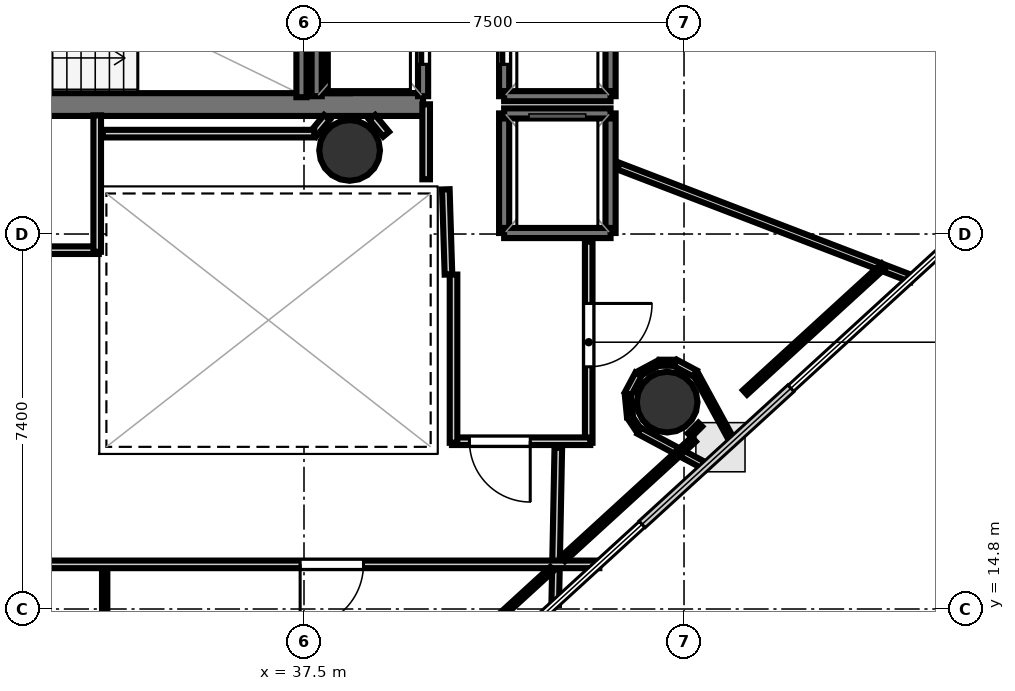
"""IFC4 building model, lengths in metres.
Left out: names, types, materials, properties, quantities, classifications, styles, units other than length and angle.
Written with IfcOpenShell. Run it as: python <this file> out.ifc"""

import sys

from ifc_helpers import new_model, si_unit, direction, frame, frame_2d, origin, origin_2d, place, context, subcontext, project, spatial, rectangle, hollow_circle, extrude, element, fill, save


model = new_model("IFC4")
c1 = context("Model", 3, precision=1e-05, world=origin(), true_north=direction((0.0, 1.0)))
c2 = subcontext(c1, "Body", "Model", "MODEL_VIEW")
j1 = project(units=[si_unit("LENGTHUNIT", "METRE"), si_unit("PLANEANGLEUNIT", "RADIAN")], contexts=[c1])
p1 = place(None, origin())
s1 = spatial("IfcSite", under=j1, at=p1, CompositionType="ELEMENT")
p2 = place(p1, origin())
s2 = spatial("IfcBuilding", under=s1, at=p2, CompositionType="ELEMENT")
p3 = place(p2, frame((0.0, 0.0, 222.5)))
s3 = spatial("IfcBuildingStorey", under=s2, at=p3, CompositionType="ELEMENT", Elevation=222.5)
p4 = place(p3, frame((29.33, 24.755, 0.0), z_axis=(0.0, 0.0, 1.0), x_axis=(1.0, 0.0, 0.0)))
e1 = element("IfcWall", 1, at=p4, inside=s3, PredefinedType="SHEAR", context=c2, shape_type="SweptSolid", body=[
    extrude(rectangle(XDim=10.52, YDim=0.45, at=frame_2d((5.26, 0.0))), origin(), (0.0, 0.0, 1.0), 3.52),
])
p5 = place(p4, frame((0.695, 0.0, 0.0)))
e2 = element("IfcOpeningElement", 2, at=p5, cuts=e1, PredefinedType="OPENING", context=c2, shape_type="SweptSolid", body=[
    extrude(rectangle(XDim=1.25, YDim=2.15, at=frame_2d((0.625, 1.075))), frame((0.0, 0.235, 0.0), z_axis=(0.0, -1.0, 0.0), x_axis=(1.0, 0.0, 0.0)), (0.0, 0.0, 1.0), 0.47),
])
p6 = place(p3, frame((38.18, 24.98, 0.0), z_axis=(0.0, 0.0, 1.0), x_axis=(0.0, 1.0, 0.0)))
e3 = element("IfcWall", 3, at=p6, inside=s3, PredefinedType="SHEAR", context=c2, shape_type="SweptSolid", body=[
    extrude(rectangle(XDim=7.44, YDim=0.45, at=frame_2d((3.72, 0.0))), origin(), (0.0, 0.0, 1.0), 3.52),
])
for number, where, z_axis, x_axis in (
    (4, (38.4, 23.85, 0.0), (0.0, 0.0, 1.0), (1.0, 0.0, 0.0)),
    (5, (44.667, 18.883, 0.0), (0.0, 0.0, 1.0), (1.0, 0.0, 0.0)),
):
    element("IfcColumn", number, at=place(p3, frame(where, z_axis=z_axis, x_axis=x_axis)), inside=s3, PredefinedType="COLUMN", context=c2, shape_type="SweptSolid", body=[
        extrude(hollow_circle(Radius=0.6, WallThickness=0.03, at=origin_2d()), origin(), (0.0, 0.0, 1.0), 3.7),
    ])
p7 = place(p3, frame((37.45, 24.9, 0.0), z_axis=(0.0, 0.0, 1.0), x_axis=(0.0, 1.0, 0.0)))
e6 = element("IfcWall", 6, at=p7, inside=s3, PredefinedType="SOLIDWALL", context=c2, shape_type="SweptSolid", body=[
    extrude(rectangle(XDim=3.06, YDim=0.2, at=frame_2d((1.53, 0.0))), origin(), (0.0, 0.0, 1.0), 3.52),
])
p8 = place(p3, frame((39.85, 24.92, 0.0), z_axis=(0.0, 0.0, 1.0), x_axis=(0.0, 1.0, 0.0)))
e7 = element("IfcWall", 7, at=p8, inside=s3, PredefinedType="SOLIDWALL", context=c2, shape_type="SweptSolid", body=[
    extrude(rectangle(XDim=2.36, YDim=0.2, at=frame_2d((1.18, 0.0))), origin(), (0.0, 0.0, 1.0), 3.52),
])
p9 = place(p8, frame((0.63, 0.0, 0.0)))
e8 = element("IfcOpeningElement", 8, at=p9, cuts=e7, PredefinedType="OPENING", context=c2, shape_type="SweptSolid", body=[
    extrude(rectangle(XDim=1.1, YDim=2.15, at=frame_2d((0.55, 1.075))), frame((0.0, 0.11, 0.0), z_axis=(0.0, -1.0, 0.0), x_axis=(1.0, 0.0, 0.0)), (0.0, 0.0, 1.0), 0.22),
])
for number, where, z_axis, x_axis in (
    (9, (37.75, 24.92, 0.0), (0.0, 0.0, 1.0), (0.0, 1.0, 0.0)),
    (10, (43.55, 24.92, 0.0), (0.0, 0.0, 1.0), (0.0, 1.0, 0.0)),
):
    element("IfcWall", number, at=place(p3, frame(where, z_axis=z_axis, x_axis=x_axis)), inside=s3, PredefinedType="SOLIDWALL", context=c2, shape_type="SweptSolid", body=[
        extrude(rectangle(XDim=2.36, YDim=0.2, at=frame_2d((1.18, 0.0))), origin(), (0.0, 0.0, 1.0), 3.52),
    ])
p10 = place(p3, frame((41.45, 24.92, 0.0), z_axis=(0.0, 0.0, 1.0), x_axis=(0.0, 1.0, 0.0)))
e11 = element("IfcWall", 11, at=p10, inside=s3, PredefinedType="SOLIDWALL", context=c2, shape_type="SweptSolid", body=[
    extrude(rectangle(XDim=2.36, YDim=0.2, at=frame_2d((1.18, 0.0))), origin(), (0.0, 0.0, 1.0), 3.52),
])
p11 = place(p10, frame((0.63, 0.0, 0.0)))
e12 = element("IfcOpeningElement", 12, at=p11, cuts=e11, PredefinedType="OPENING", context=c2, shape_type="SweptSolid", body=[
    extrude(rectangle(XDim=1.1, YDim=2.15, at=frame_2d((0.55, 1.075))), frame((0.0, 0.11, 0.0), z_axis=(0.0, -1.0, 0.0), x_axis=(1.0, 0.0, 0.0)), (0.0, 0.0, 1.0), 0.22),
])
p12 = place(p3, frame((41.45, 24.92, 0.0), z_axis=(0.0, 0.0, 1.0), x_axis=(1.0, 0.0, 0.0)))
e13 = element("IfcWall", 13, at=p12, inside=s3, PredefinedType="SOLIDWALL", context=c2, shape_type="SweptSolid", body=[
    extrude(rectangle(XDim=2.1, YDim=0.2, at=frame_2d((1.05, 0.0))), origin(), (0.0, 0.0, 1.0), 3.52),
])
for number, where, z_axis, x_axis in (
    (14, (43.55, 22.22, 0.0), (0.0, 0.0, 1.0), (0.0, 1.0, 0.0)),
    (15, (41.45, 22.22, 0.0), (0.0, 0.0, 1.0), (0.0, 1.0, 0.0)),
):
    element("IfcWall", number, at=place(p3, frame(where, z_axis=z_axis, x_axis=x_axis)), inside=s3, PredefinedType="SOLIDWALL", context=c2, shape_type="SweptSolid", body=[
        extrude(rectangle(XDim=2.36, YDim=0.2, at=frame_2d((1.18, 0.0))), origin(), (0.0, 0.0, 1.0), 3.52),
    ])
for number, where, z_axis, x_axis in (
    (16, (41.45, 24.58, 0.0), (0.0, 0.0, 1.0), (1.0, 0.0, 0.0)),
    (17, (41.45, 22.22, 0.0), (0.0, 0.0, 1.0), (1.0, 0.0, 0.0)),
):
    element("IfcWall", number, at=place(p3, frame(where, z_axis=z_axis, x_axis=x_axis)), inside=s3, PredefinedType="SOLIDWALL", context=c2, shape_type="SweptSolid", body=[
        extrude(rectangle(XDim=2.1, YDim=0.2, at=frame_2d((1.05, 0.0))), origin(), (0.0, 0.0, 1.0), 3.52),
    ])
p13 = place(p3, frame((33.45, 21.881, 0.0), z_axis=(0.0, 0.0, 1.0), x_axis=(-1.0, 0.0, 0.0)))
e18 = element("IfcWall", 18, at=p13, inside=s3, PredefinedType="PARTITIONING", context=c2, shape_type="SweptSolid", body=[
    extrude(rectangle(XDim=3.75, YDim=0.15, at=frame_2d((1.875, 0.0))), origin(), (0.0, 0.0, 1.0), 2.84),
])
p14 = place(p13, frame((1.275, 0.0, 0.0)))
e19 = element("IfcOpeningElement", 19, at=p14, cuts=e18, PredefinedType="OPENING", context=c2, shape_type="SweptSolid", body=[
    extrude(rectangle(XDim=1.2, YDim=2.15, at=frame_2d((0.6, 1.075))), frame((0.0, 0.085, 0.0), z_axis=(0.0, -1.0, 0.0), x_axis=(1.0, 0.0, 0.0)), (0.0, 0.0, 1.0), 0.17),
])
p15 = place(p13, frame((2.66, 0.0, 0.0)))
e20 = element("IfcOpeningElement", 20, at=p15, cuts=e18, PredefinedType="OPENING", context=c2, shape_type="SweptSolid", body=[
    extrude(rectangle(XDim=0.86, YDim=2.05, at=frame_2d((0.43, 1.025))), frame((0.0, 0.085, 0.0), z_axis=(0.0, -1.0, 0.0), x_axis=(1.0, 0.0, 0.0)), (0.0, 0.0, 1.0), 0.17),
])
p16 = place(p3, frame((33.419, 24.542, 0.0), z_axis=(0.0, 0.0, 1.0), x_axis=(0.0, -1.0, 0.0)))
e21 = element("IfcWall", 21, at=p16, inside=s3, PredefinedType="PARTITIONING", context=c2, shape_type="SweptSolid", body=[
    extrude(rectangle(XDim=2.692, YDim=0.15, at=frame_2d((1.346, 0.0))), origin(), (0.0, 0.0, 1.0), 2.84),
])
p17 = place(p3, frame((40.351, 21.401, 0.0), z_axis=(0.0, 0.0, 1.0), x_axis=(-0.031058045979, 0.999517582527, 0.0)))
e22 = element("IfcWall", 22, at=p17, inside=s3, PredefinedType="PARTITIONING", context=c2, shape_type="SweptSolid", body=[
    extrude(rectangle(XDim=1.682, YDim=0.15, at=frame_2d((0.841, 0.0))), origin(), (0.0, 0.0, 1.0), 2.84),
])
p18 = place(p3, frame((39.911, 23.28, 0.0), z_axis=(0.0, 0.0, 1.0), x_axis=(0.0, 1.0, 0.0)))
e23 = element("IfcWall", 23, at=p18, inside=s3, PredefinedType="PARTITIONING", context=c2, shape_type="SweptSolid", body=[
    extrude(rectangle(XDim=1.48, YDim=0.15, at=frame_2d((0.74, 0.0))), origin(), (0.0, 0.0, 1.0), 2.84),
])
p19 = place(p3, frame((43.119, 22.05, 0.0), z_axis=(0.0, 0.0, 1.0), x_axis=(0.0, -1.0, 0.0)))
e24 = element("IfcWall", 24, at=p19, inside=s3, PredefinedType="PARTITIONING", context=c2, shape_type="SweptSolid", body=[
    extrude(rectangle(XDim=3.97, YDim=0.15, at=frame_2d((1.985, 0.0))), origin(), (0.0, 0.0, 1.0), 2.84),
])
p20 = place(p19, frame((1.22, 0.0, 0.0)))
e25 = element("IfcOpeningElement", 25, at=p20, cuts=e24, PredefinedType="OPENING", context=c2, shape_type="SweptSolid", body=[
    extrude(rectangle(XDim=1.25, YDim=2.2, at=frame_2d((0.625, 1.1))), frame((0.0, 0.085, 0.0), z_axis=(0.0, -1.0, 0.0), x_axis=(1.0, 0.0, 0.0)), (0.0, 0.0, 1.0), 0.17),
])
p21 = place(p3, frame((43.15, 18.111, 0.0), z_axis=(0.0, 0.0, 1.0), x_axis=(-1.0, 0.0, 0.0)))
e26 = element("IfcWall", 26, at=p21, inside=s3, PredefinedType="PARTITIONING", context=c2, shape_type="SweptSolid", body=[
    extrude(rectangle(XDim=2.73, YDim=0.15, at=frame_2d((1.365, 0.0))), origin(), (0.0, 0.0, 1.0), 2.84),
])
p22 = place(p21, frame((1.185, 0.0, 0.0)))
e27 = element("IfcOpeningElement", 27, at=p22, cuts=e26, PredefinedType="OPENING", context=c2, shape_type="SweptSolid", body=[
    extrude(rectangle(XDim=1.2, YDim=2.15, at=frame_2d((0.6, 1.075))), frame((0.0, 0.085, 0.0), z_axis=(0.0, -1.0, 0.0), x_axis=(1.0, 0.0, 0.0)), (0.0, 0.0, 1.0), 0.17),
])
p23 = place(p3, frame((40.451, 18.08, 0.0), z_axis=(0.0, 0.0, 1.0), x_axis=(0.0, 1.0, 0.0)))
e28 = element("IfcWall", 28, at=p23, inside=s3, PredefinedType="PARTITIONING", context=c2, shape_type="SweptSolid", body=[
    extrude(rectangle(XDim=3.32, YDim=0.15, at=frame_2d((1.66, 0.0))), origin(), (0.0, 0.0, 1.0), 2.84),
])
for number, where, z_axis, x_axis in (
    (29, (39.121, 24.17, 0.0), (0.0, 0.0, 1.0), (-0.638, 0.77, 0.0)),
    (30, (37.954, 24.502, 0.0), (0.0, 0.0, 1.0), (-0.638, -0.77, 0.0)),
):
    element("IfcWall", number, at=place(p3, frame(where, z_axis=z_axis, x_axis=x_axis)), inside=s3, PredefinedType="PARTITIONING", context=c2, shape_type="SweptSolid", body=[
        extrude(rectangle(XDim=0.431, YDim=0.15, at=frame_2d((0.215, 0.0))), origin(), (0.0, 0.0, 1.0), 2.84),
    ])
p24 = place(p3, frame((37.703, 24.181, 0.0), z_axis=(0.0, 0.0, 1.0), x_axis=(-1.0, 0.0, 0.0)))
e31 = element("IfcWall", 31, at=p24, inside=s3, PredefinedType="PARTITIONING", context=c2, shape_type="SweptSolid", body=[
    extrude(rectangle(XDim=4.173, YDim=0.15, at=frame_2d((2.086, 0.0))), origin(), (0.0, 0.0, 1.0), 2.84),
])
p25 = place(p3, frame((42.519, 17.981, 0.0), z_axis=(0.0, 0.0, 1.0), x_axis=(-0.019860499427, -0.99980276083, 0.0)))
e32 = element("IfcWall", 32, at=p25, inside=s3, PredefinedType="PARTITIONING", context=c2, shape_type="SweptSolid", body=[
    extrude(rectangle(XDim=3.098, YDim=0.15, at=frame_2d((1.549, 0.0))), origin(), (0.0, 0.0, 1.0), 2.84),
])
p26 = place(p3, frame((43.328, 15.681, 0.0), z_axis=(0.0, 0.0, 1.0), x_axis=(-1.0, 0.0, 0.0)))
e33 = element("IfcWall", 33, at=p26, inside=s3, PredefinedType="PARTITIONING", context=c2, shape_type="SweptSolid", body=[
    extrude(rectangle(XDim=14.928, YDim=0.15, at=frame_2d((7.464, 0.0))), origin(), (0.0, 0.0, 1.0), 2.84),
])
p27 = place(p26, frame((11.334, 0.0, 0.0)))
e34 = element("IfcOpeningElement", 34, at=p27, cuts=e33, PredefinedType="OPENING", context=c2, shape_type="SweptSolid", body=[
    extrude(rectangle(XDim=1.25, YDim=2.2, at=frame_2d((0.625, 1.1))), frame((0.0, 0.085, 0.0), z_axis=(0.0, -1.0, 0.0), x_axis=(1.0, 0.0, 0.0)), (0.0, 0.0, 1.0), 0.17),
])
p28 = place(p26, frame((4.655, 0.0, 0.0)))
e35 = element("IfcOpeningElement", 35, at=p28, cuts=e33, PredefinedType="OPENING", context=c2, shape_type="SweptSolid", body=[
    extrude(rectangle(XDim=1.25, YDim=2.2, at=frame_2d((0.625, 1.1))), frame((0.0, 0.085, 0.0), z_axis=(0.0, -1.0, 0.0), x_axis=(1.0, 0.0, 0.0)), (0.0, 0.0, 1.0), 0.17),
])
p29 = place(p3, frame((33.566, 15.57, 0.0), z_axis=(0.0, 0.0, 1.0), x_axis=(0.0, -1.0, 0.0)))
e36 = element("IfcWall", 36, at=p29, inside=s3, PredefinedType="PARTITIONING", context=c2, shape_type="SweptSolid", body=[
    extrude(rectangle(XDim=4.305, YDim=0.105, at=frame_2d((2.152, 0.0))), origin(), (0.0, 0.0, 1.0), 2.84),
])
p30 = place(p3, frame((42.396, 15.593, 0.0), z_axis=(0.0, 0.0, 1.0), x_axis=(-0.738061977913, -0.67473292254, 0.0)))
e37 = element("IfcWall", 37, at=p30, inside=s3, PredefinedType="PARTITIONING", context=c2, shape_type="SweptSolid", body=[
    extrude(rectangle(XDim=11.835, YDim=0.105, at=frame_2d((5.917, 0.0))), origin(), (0.0, 0.0, 1.0), 2.84),
])
p31 = place(p3, frame((43.709, 23.538, 0.0), z_axis=(0.0, 0.0, 1.0), x_axis=(0.93358484642, -0.35835643504, 0.0)))
e38 = element("IfcWall", 38, at=p31, inside=s3, PredefinedType="PARTITIONING", context=c2, shape_type="SweptSolid", body=[
    extrude(rectangle(XDim=6.202, YDim=0.14, at=frame_2d((3.101, 0.0))), origin(), (0.0, 0.0, 1.0), 2.84),
])
p32 = place(p3, frame((48.942, 21.578, 0.0), z_axis=(0.0, 0.0, 1.0), x_axis=(-0.738076553921, -0.674716978112, 0.0)))
e39 = element("IfcWall", 39, at=p32, inside=s3, PredefinedType="PARTITIONING", context=c2, shape_type="SweptSolid", body=[
    extrude(rectangle(XDim=3.711, YDim=0.12, at=frame_2d((1.855, 0.0))), origin(), (0.0, 0.0, 1.0), 2.84),
])
p33 = place(p3, frame((45.968, 18.086, 0.0), z_axis=(0.0, 0.0, 1.0), x_axis=(-0.478818749428, 0.877913780047, 0.0)))
e40 = element("IfcWall", 40, at=p33, inside=s3, PredefinedType="PARTITIONING", context=c2, shape_type="SweptSolid", body=[
    extrude(rectangle(XDim=1.537, YDim=0.105, at=frame_2d((0.769, 0.0))), origin(), (0.0, 0.0, 1.0), 2.84),
])
p34 = place(p3, frame((45.219, 19.448, 0.0), z_axis=(0.0, 0.0, 1.0), x_axis=(-0.881923737177, 0.471392110461, 0.0)))
e41 = element("IfcWall", 41, at=p34, inside=s3, PredefinedType="PARTITIONING", context=c2, shape_type="SweptSolid", body=[
    extrude(rectangle(XDim=0.441, YDim=0.14, at=frame_2d((0.221, 0.0))), origin(), (0.0, 0.0, 1.0), 2.84),
])
p35 = place(p3, frame((44.815, 19.659, 0.0), z_axis=(0.0, 0.0, 1.0), x_axis=(-1.0, 0.0, 0.0)))
e42 = element("IfcWall", 42, at=p35, inside=s3, PredefinedType="PARTITIONING", context=c2, shape_type="SweptSolid", body=[
    extrude(rectangle(XDim=0.296, YDim=0.12, at=frame_2d((0.148, 0.0))), origin(), (0.0, 0.0, 1.0), 2.84),
])
p36 = place(p3, frame((44.504, 19.656, 0.0), z_axis=(0.0, 0.0, 1.0), x_axis=(-0.881923737177, -0.471392110461, 0.0)))
e43 = element("IfcWall", 43, at=p36, inside=s3, PredefinedType="PARTITIONING", context=c2, shape_type="SweptSolid", body=[
    extrude(rectangle(XDim=0.441, YDim=0.105, at=frame_2d((0.221, 0.0))), origin(), (0.0, 0.0, 1.0), 2.84),
])
p37 = place(p3, frame((44.102, 19.435, 0.0), z_axis=(0.0, 0.0, 1.0), x_axis=(-0.471392110461, -0.881923737177, 0.0)))
e44 = element("IfcWall", 44, at=p37, inside=s3, PredefinedType="PARTITIONING", context=c2, shape_type="SweptSolid", body=[
    extrude(rectangle(XDim=0.441, YDim=0.14, at=frame_2d((0.221, 0.0))), origin(), (0.0, 0.0, 1.0), 2.84),
])
p38 = place(p3, frame((43.891, 19.028, 0.0), z_axis=(0.0, 0.0, 1.0), x_axis=(0.097915215421, -0.995194760129, 0.0)))
e45 = element("IfcWall", 45, at=p38, inside=s3, PredefinedType="PARTITIONING", context=c2, shape_type="SweptSolid", body=[
    extrude(rectangle(XDim=0.441, YDim=0.12, at=frame_2d((0.221, 0.0))), origin(), (0.0, 0.0, 1.0), 2.84),
])
p39 = place(p3, frame((43.939, 18.575, 0.0), z_axis=(0.0, 0.0, 1.0), x_axis=(0.55508024351, -0.831796804072, 0.0)))
e46 = element("IfcWall", 46, at=p39, inside=s3, PredefinedType="PARTITIONING", context=c2, shape_type="SweptSolid", body=[
    extrude(rectangle(XDim=0.296, YDim=0.105, at=frame_2d((0.148, 0.0))), origin(), (0.0, 0.0, 1.0), 2.84),
])
p40 = place(p3, frame((44.115, 18.318, 0.0), z_axis=(0.0, 0.0, 1.0), x_axis=(0.881913089805, -0.471412030002, 0.0)))
e47 = element("IfcWall", 47, at=p40, inside=s3, PredefinedType="PARTITIONING", context=c2, shape_type="SweptSolid", body=[
    extrude(rectangle(XDim=1.507, YDim=0.14, at=frame_2d((0.753, 0.0))), origin(), (0.0, 0.0, 1.0), 2.84),
])
p41 = place(p3, frame((45.111, 18.229, 0.0), z_axis=(0.0, 0.0, 1.0), x_axis=(0.707518488087, 0.706694834434, 0.0)))
e48 = element("IfcWall", 48, at=p41, inside=s3, PredefinedType="PARTITIONING", context=c2, shape_type="SweptSolid", body=[
    extrude(rectangle(XDim=0.296, YDim=0.105, at=frame_2d((0.148, 0.0))), origin(), (0.0, 0.0, 1.0), 2.84),
])
p42 = place(p3, frame((45.191, 18.149, 0.0), z_axis=(0.0, 0.0, 1.0), x_axis=(-0.738077461562, -0.674715985237, 0.0)))
e49 = element("IfcWall", 49, at=p42, inside=s3, PredefinedType="PARTITIONING", context=c2, shape_type="SweptSolid", body=[
    extrude(rectangle(XDim=3.499, YDim=0.12, at=frame_2d((1.749, 0.0))), origin(), (0.0, 0.0, 1.0), 2.84),
])
p43 = place(p9, origin())
e50 = element("IfcDoor", 50, at=p43, inside=s3, OperationType="SLIDING_TO_LEFT", PredefinedType="DOOR", context=c2, shape_type="SweptSolid", body=[
    extrude(rectangle(XDim=1.1, YDim=2.15, at=frame_2d((0.55, 1.075))), frame((0.0, 0.025, 0.0), z_axis=(0.0, -1.0, 0.0), x_axis=(1.0, 0.0, 0.0)), (0.0, 0.0, 1.0), 0.05),
])
fill(e8, e50)
p44 = place(p11, origin())
e51 = element("IfcDoor", 51, at=p44, inside=s3, OperationType="SLIDING_TO_LEFT", PredefinedType="DOOR", context=c2, shape_type="SweptSolid", body=[
    extrude(rectangle(XDim=1.1, YDim=2.15, at=frame_2d((0.55, 1.075))), frame((0.0, 0.025, 0.0), z_axis=(0.0, -1.0, 0.0), x_axis=(1.0, 0.0, 0.0)), (0.0, 0.0, 1.0), 0.05),
])
fill(e12, e51)
p45 = place(p22, origin())
e52 = element("IfcDoor", 52, at=p45, inside=s3, OperationType="SINGLE_SWING_LEFT", PredefinedType="DOOR", context=c2, shape_type="SweptSolid", body=[
    extrude(rectangle(XDim=1.2, YDim=2.15, at=frame_2d((0.6, 1.075))), frame((0.0, 0.025, 0.0), z_axis=(0.0, -1.0, 0.0), x_axis=(1.0, 0.0, 0.0)), (0.0, 0.0, 1.0), 0.05),
])
fill(e27, e52)
p46 = place(p28, origin())
e53 = element("IfcDoor", 53, at=p46, inside=s3, OperationType="SINGLE_SWING_RIGHT", PredefinedType="DOOR", context=c2, shape_type="SweptSolid", body=[
    extrude(rectangle(XDim=1.25, YDim=2.2, at=frame_2d((0.625, 1.1))), frame((0.0, 0.025, 0.0), z_axis=(0.0, -1.0, 0.0), x_axis=(1.0, 0.0, 0.0)), (0.0, 0.0, 1.0), 0.05),
])
fill(e35, e53)
p47 = place(p20, origin())
e54 = element("IfcDoor", 54, at=p47, inside=s3, OperationType="SINGLE_SWING_LEFT", PredefinedType="DOOR", context=c2, shape_type="SweptSolid", body=[
    extrude(rectangle(XDim=1.25, YDim=2.2, at=frame_2d((0.625, 1.1))), frame((0.0, 0.025, 0.0), z_axis=(0.0, -1.0, 0.0), x_axis=(1.0, 0.0, 0.0)), (0.0, 0.0, 1.0), 0.05),
])
fill(e25, e54)
save(model, sys.argv[1])
